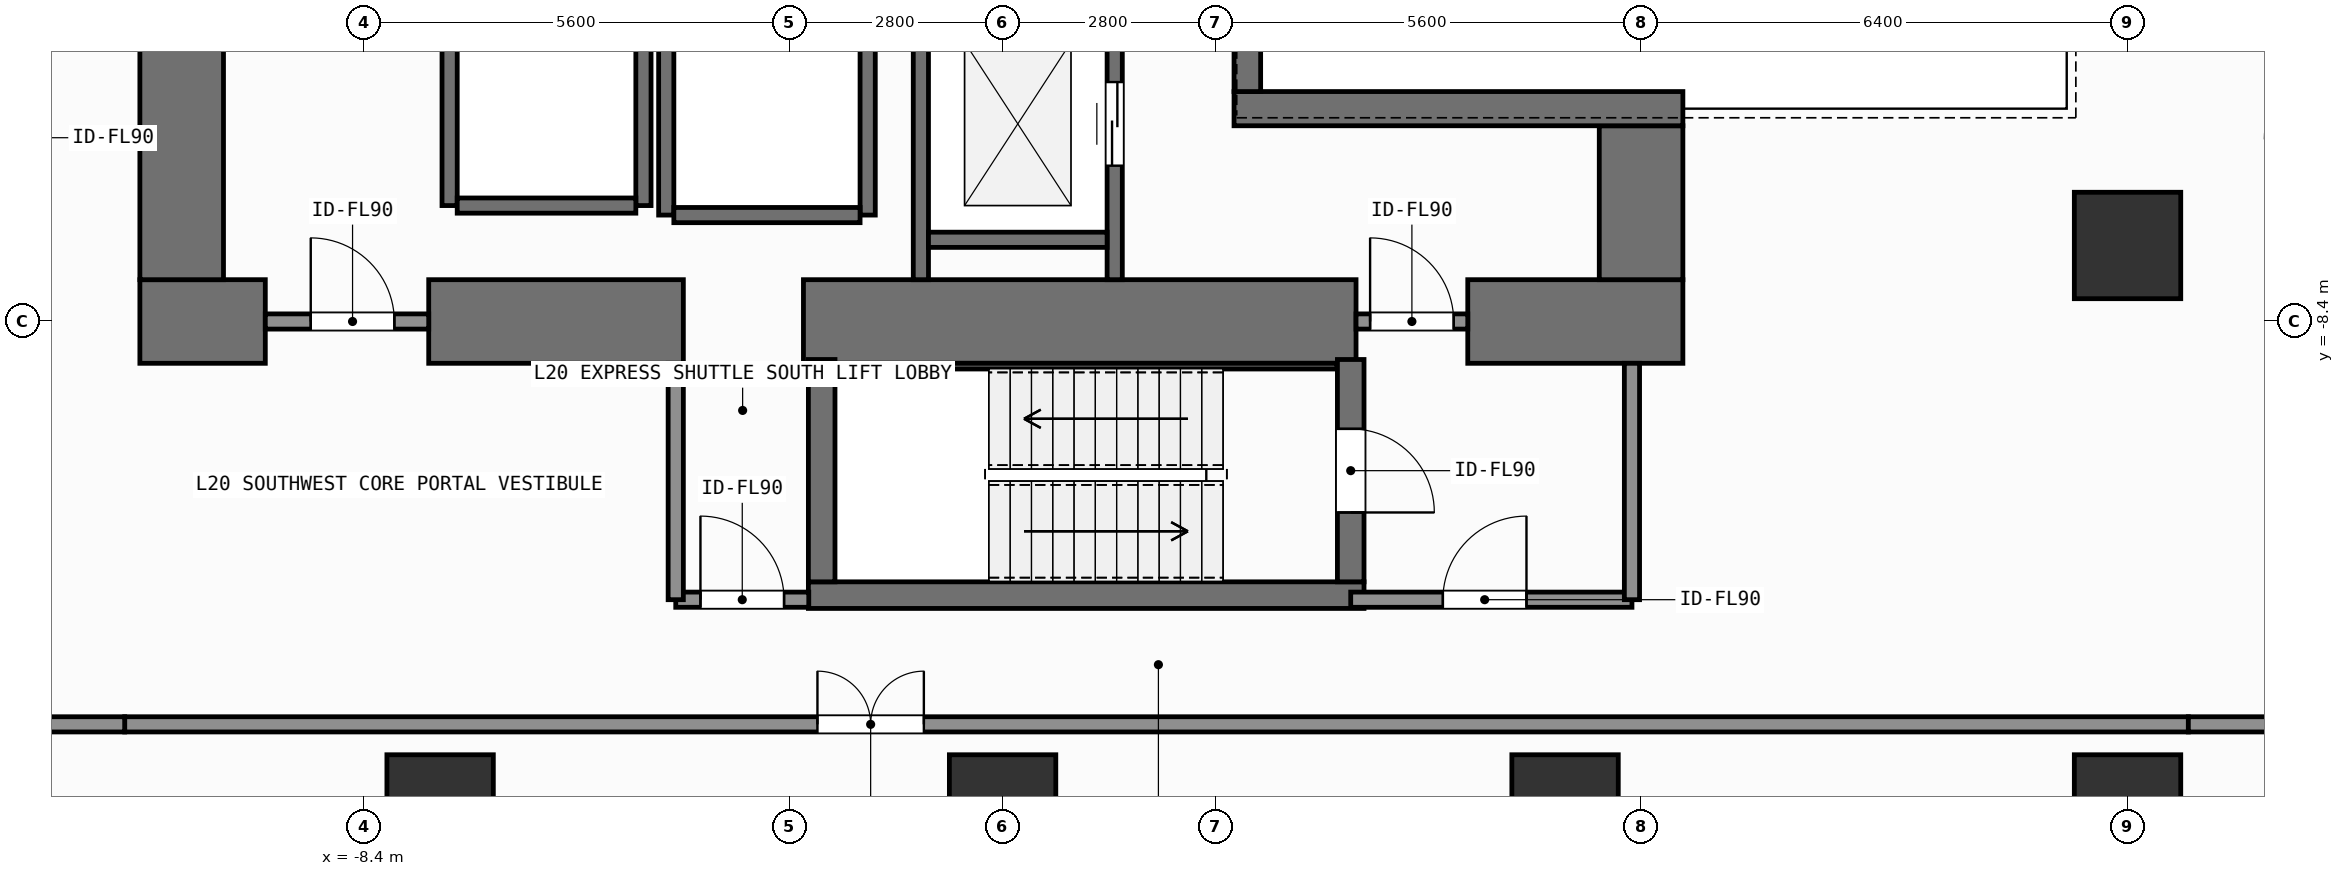
"""IFC4 building model, lengths in metres.
Left out: names, types, materials, properties, quantities, classifications, styles, units other than length and angle.
Written with IfcOpenShell. Run it as: python <this file> out.ifc"""

import sys

from ifc_helpers import new_model, si_unit, direction, frame, frame_2d, origin, origin_2d, place, context, subcontext, project, spatial, rectangle, extrude, element, fill, save


model = new_model("IFC4")
c1 = context("Model", 3, precision=1e-05, world=origin(), true_north=direction((0.0, 1.0)))
c2 = subcontext(c1, "Body", "Model", "MODEL_VIEW")
j1 = project(units=[si_unit("LENGTHUNIT", "METRE"), si_unit("PLANEANGLEUNIT", "RADIAN")], contexts=[c1])
p1 = place(None, origin())
s1 = spatial("IfcSite", under=j1, at=p1, CompositionType="ELEMENT")
p2 = place(p1, origin())
s2 = spatial("IfcBuilding", under=s1, at=p2, CompositionType="ELEMENT")
p3 = place(p2, frame((0.0, 0.0, 77.4)))
s3 = spatial("IfcBuildingStorey", under=s2, at=p3, CompositionType="ELEMENT", Elevation=77.4)
p4 = place(p3, frame((-11.35, -8.4, 0.0), z_axis=(0.0, 0.0, 1.0), x_axis=(1.0, 0.0, 0.0)))
e1 = element("IfcWall", 1, at=p4, inside=s3, PredefinedType="SHEAR", context=c2, shape_type="SweptSolid", body=[
    extrude(rectangle(XDim=1.65, YDim=1.1, at=frame_2d((0.825, 0.0))), origin(), (0.0, 0.0, 1.0), 7.8),
])
p5 = place(p3, frame((-7.55, -8.4, 0.0), z_axis=(0.0, 0.0, 1.0), x_axis=(1.0, 0.0, 0.0)))
e2 = element("IfcWall", 2, at=p5, inside=s3, PredefinedType="SHEAR", context=c2, shape_type="SweptSolid", body=[
    extrude(rectangle(XDim=3.35, YDim=1.1, at=frame_2d((1.675, 0.0))), origin(), (0.0, 0.0, 1.0), 7.8),
])
p6 = place(p3, frame((-2.62, -8.4, 0.0), z_axis=(0.0, 0.0, 1.0), x_axis=(1.0, 0.0, 0.0)))
e3 = element("IfcWall", 3, at=p6, inside=s3, PredefinedType="SHEAR", context=c2, shape_type="SweptSolid", body=[
    extrude(rectangle(XDim=7.27, YDim=1.1, at=frame_2d((3.635, 0.0))), origin(), (0.0, 0.0, 1.0), 7.8),
])
p7 = place(p3, frame((6.12, -8.4, 0.0), z_axis=(0.0, 0.0, 1.0), x_axis=(1.0, 0.0, 0.0)))
e4 = element("IfcWall", 4, at=p7, inside=s3, PredefinedType="SHEAR", context=c2, shape_type="SweptSolid", body=[
    extrude(rectangle(XDim=2.83, YDim=1.1, at=frame_2d((1.415, 0.0))), origin(), (0.0, 0.0, 1.0), 7.8),
])
p8 = place(p3, frame((-10.8, -7.85, 0.0), z_axis=(0.0, 0.0, 1.0), x_axis=(0.0, 1.0, 0.0)))
e5 = element("IfcWall", 5, at=p8, inside=s3, PredefinedType="SHEAR", context=c2, shape_type="SweptSolid", body=[
    extrude(rectangle(XDim=15.7, YDim=1.1, at=frame_2d((7.85, 0.0))), origin(), (0.0, 0.0, 1.0), 7.8),
])
p9 = place(p3, frame((8.4, -7.85, 0.0), z_axis=(0.0, 0.0, 1.0), x_axis=(0.0, 1.0, 0.0)))
e6 = element("IfcWall", 6, at=p9, inside=s3, PredefinedType="SHEAR", context=c2, shape_type="SweptSolid", body=[
    extrude(rectangle(XDim=2.025, YDim=1.1, at=frame_2d((1.013, 0.0))), origin(), (0.0, 0.0, 1.0), 7.8),
])
p10 = place(p3, frame((3.045, -5.6, 0.0), z_axis=(0.0, 0.0, 1.0), x_axis=(1.0, 0.0, 0.0)))
e7 = element("IfcWall", 7, at=p10, inside=s3, PredefinedType="SHEAR", context=c2, shape_type="SweptSolid", body=[
    extrude(rectangle(XDim=5.905, YDim=0.45, at=frame_2d((2.953, 0.0))), origin(), (0.0, 0.0, 1.0), 7.8),
])
p11 = place(p3, frame((3.22, -5.375, 0.0), z_axis=(0.0, 0.0, 1.0), x_axis=(0.0, 1.0, 0.0)))
e8 = element("IfcWall", 8, at=p11, inside=s3, PredefinedType="SHEAR", context=c2, shape_type="SweptSolid", body=[
    extrude(rectangle(XDim=10.75, YDim=0.35, at=frame_2d((5.375, 0.0))), origin(), (0.0, 0.0, 1.0), 7.8),
])
p12 = place(p3, frame((-2.555, -12.0, 0.0), z_axis=(0.0, 0.0, 1.0), x_axis=(1.0, 0.0, 0.0)))
e9 = element("IfcWall", 9, at=p12, inside=s3, PredefinedType="SHEAR", context=c2, shape_type="SweptSolid", body=[
    extrude(rectangle(XDim=7.31, YDim=0.35, at=frame_2d((3.655, 0.0))), origin(), (0.0, 0.0, 1.0), 7.8),
])
p13 = place(p3, frame((-2.2, -8.988, 0.0), z_axis=(0.0, 0.0, 1.0), x_axis=(1.0, 0.0, 0.0)))
e10 = element("IfcWall", 10, at=p13, inside=s3, PredefinedType="SHEAR", context=c2, shape_type="SweptSolid", body=[
    extrude(rectangle(XDim=6.6, YDim=0.075, at=frame_2d((3.3, 0.0))), origin(), (0.0, 0.0, 1.0), 7.8),
])
p14 = place(p3, frame((-2.38, -11.825, 0.0), z_axis=(0.0, 0.0, 1.0), x_axis=(0.0, 1.0, 0.0)))
e11 = element("IfcWall", 11, at=p14, inside=s3, PredefinedType="SHEAR", context=c2, shape_type="SweptSolid", body=[
    extrude(rectangle(XDim=2.925, YDim=0.35, at=frame_2d((1.462, 0.0))), origin(), (0.0, 0.0, 1.0), 7.8),
])
p15 = place(p3, frame((4.58, -8.9, 0.0), z_axis=(0.0, 0.0, 1.0), x_axis=(0.0, -1.0, 0.0)))
e12 = element("IfcWall", 12, at=p15, inside=s3, PredefinedType="SHEAR", context=c2, shape_type="SweptSolid", body=[
    extrude(rectangle(XDim=2.925, YDim=0.35, at=frame_2d((1.462, 0.0))), origin(), (0.0, 0.0, 1.0), 7.8),
])
p16 = place(p15, frame((0.913, 0.0, 0.0)))
e13 = element("IfcOpeningElement", 13, at=p16, cuts=e12, PredefinedType="OPENING", context=c2, shape_type="SweptSolid", body=[
    extrude(rectangle(XDim=1.1, YDim=2.15, at=frame_2d((0.55, 1.075))), frame((0.0, 0.185, 0.0), z_axis=(0.0, -1.0, 0.0), x_axis=(1.0, 0.0, 0.0)), (0.0, 0.0, 1.0), 0.37),
])
for number, where, z_axis, x_axis in (
    (14, (-7.4, -14.8, 0.0), (0.0, 0.0, 1.0), (1.0, 0.0, 0.0)),
    (15, (0.0, -14.8, 0.0), (0.0, 0.0, 1.0), (1.0, 0.0, 0.0)),
    (16, (7.4, -14.8, 0.0), (0.0, 0.0, 1.0), (1.0, 0.0, 0.0)),
    (17, (14.8, -14.8, 0.0), (0.0, 0.0, 1.0), (1.0, 0.0, 0.0)),
    (18, (14.8, -7.4, 0.0), (0.0, 0.0, 1.0), (1.0, 0.0, 0.0)),
):
    element("IfcColumn", number, at=place(p3, frame(where, z_axis=z_axis, x_axis=x_axis)), inside=s3, PredefinedType="COLUMN", context=c2, shape_type="SweptSolid", body=[
        extrude(rectangle(XDim=1.4, YDim=1.4, at=origin_2d()), origin(), (0.0, 0.0, 1.0), 7.8),
    ])
for number, where, z_axis, x_axis in (
    (19, (-7.275, -6.875, 0.0), (0.0, 0.0, 1.0), (0.0, 1.0, 0.0)),
    (20, (-4.725, -6.875, 0.0), (0.0, 0.0, 1.0), (0.0, 1.0, 0.0)),
):
    element("IfcWall", number, at=place(p3, frame(where, z_axis=z_axis, x_axis=x_axis)), inside=s3, PredefinedType="SHEAR", context=c2, shape_type="SweptSolid", body=[
        extrude(rectangle(XDim=2.55, YDim=0.2, at=frame_2d((1.275, 0.0))), origin(), (0.0, 0.0, 1.0), 7.52),
    ])
p17 = place(p3, frame((-7.175, -6.875, 0.0), z_axis=(0.0, 0.0, 1.0), x_axis=(1.0, 0.0, 0.0)))
e21 = element("IfcWall", 21, at=p17, inside=s3, PredefinedType="SHEAR", context=c2, shape_type="SweptSolid", body=[
    extrude(rectangle(XDim=2.35, YDim=0.2, at=frame_2d((1.175, 0.0))), origin(), (0.0, 0.0, 1.0), 7.52),
])
for number, where, z_axis, x_axis in (
    (22, (-4.425, -7.0, 0.0), (0.0, 0.0, 1.0), (0.0, 1.0, 0.0)),
    (23, (-1.775, -7.0, 0.0), (0.0, 0.0, 1.0), (0.0, 1.0, 0.0)),
):
    element("IfcWall", number, at=place(p3, frame(where, z_axis=z_axis, x_axis=x_axis)), inside=s3, PredefinedType="SHEAR", context=c2, shape_type="SweptSolid", body=[
        extrude(rectangle(XDim=2.8, YDim=0.2, at=frame_2d((1.4, 0.0))), origin(), (0.0, 0.0, 1.0), 7.52),
    ])
p18 = place(p3, frame((-4.325, -7.0, 0.0), z_axis=(0.0, 0.0, 1.0), x_axis=(1.0, 0.0, 0.0)))
e24 = element("IfcWall", 24, at=p18, inside=s3, PredefinedType="SHEAR", context=c2, shape_type="SweptSolid", body=[
    extrude(rectangle(XDim=2.45, YDim=0.2, at=frame_2d((1.225, 0.0))), origin(), (0.0, 0.0, 1.0), 7.52),
])
p19 = place(p3, frame((-1.075, -7.85, 0.0), z_axis=(0.0, 0.0, 1.0), x_axis=(0.0, 1.0, 0.0)))
e25 = element("IfcWall", 25, at=p19, inside=s3, PredefinedType="SHEAR", context=c2, shape_type="SweptSolid", body=[
    extrude(rectangle(XDim=3.575, YDim=0.2, at=frame_2d((1.788, 0.0))), origin(), (0.0, 0.0, 1.0), 7.52),
])
p20 = place(p3, frame((1.475, -7.85, 0.0), z_axis=(0.0, 0.0, 1.0), x_axis=(0.0, 1.0, 0.0)))
e26 = element("IfcWall", 26, at=p20, inside=s3, PredefinedType="SHEAR", context=c2, shape_type="SweptSolid", body=[
    extrude(rectangle(XDim=3.575, YDim=0.2, at=frame_2d((1.788, 0.0))), origin(), (0.0, 0.0, 1.0), 7.52),
])
p21 = place(p20, frame((1.5, 0.0, 0.0)))
e27 = element("IfcOpeningElement", 27, at=p21, cuts=e26, PredefinedType="OPENING", context=c2, shape_type="SweptSolid", body=[
    extrude(rectangle(XDim=1.1, YDim=2.2, at=frame_2d((0.55, 1.1))), frame((0.0, 0.11, 0.0), z_axis=(0.0, -1.0, 0.0), x_axis=(1.0, 0.0, 0.0)), (0.0, 0.0, 1.0), 0.22),
])
p22 = place(p3, frame((-0.975, -7.325, 0.0), z_axis=(0.0, 0.0, 1.0), x_axis=(1.0, 0.0, 0.0)))
e28 = element("IfcWall", 28, at=p22, inside=s3, PredefinedType="SHEAR", context=c2, shape_type="SweptSolid", body=[
    extrude(rectangle(XDim=2.35, YDim=0.2, at=frame_2d((1.175, 0.0))), origin(), (0.0, 0.0, 1.0), 7.52),
])
p23 = place(p3, frame((4.58, -12.06, 0.0), z_axis=(0.0, 0.0, 1.0), x_axis=(1.0, 0.0, 0.0)))
e29 = element("IfcWall", 29, at=p23, inside=s3, PredefinedType="SOLIDWALL", context=c2, shape_type="SweptSolid", body=[
    extrude(rectangle(XDim=3.7, YDim=0.2, at=frame_2d((1.85, 0.0))), origin(), (0.0, 0.0, 1.0), 7.52),
])
p24 = place(p23, frame((1.212, 0.0, 0.0)))
e30 = element("IfcOpeningElement", 30, at=p24, cuts=e29, PredefinedType="OPENING", context=c2, shape_type="SweptSolid", body=[
    extrude(rectangle(XDim=1.1, YDim=2.15, at=frame_2d((0.55, 1.075))), frame((0.0, 0.11, 0.0), z_axis=(0.0, -1.0, 0.0), x_axis=(1.0, 0.0, 0.0)), (0.0, 0.0, 1.0), 0.22),
])
p25 = place(p3, frame((4.65, -8.4, 0.0), z_axis=(0.0, 0.0, 1.0), x_axis=(1.0, 0.0, 0.0)))
e31 = element("IfcWall", 31, at=p25, inside=s3, PredefinedType="SOLIDWALL", context=c2, shape_type="SweptSolid", body=[
    extrude(rectangle(XDim=1.47, YDim=0.2, at=frame_2d((0.735, 0.0))), origin(), (0.0, 0.0, 1.0), 6.56),
])
p26 = place(p25, frame((0.185, 0.0, 0.0)))
e32 = element("IfcOpeningElement", 32, at=p26, cuts=e31, PredefinedType="OPENING", context=c2, shape_type="SweptSolid", body=[
    extrude(rectangle(XDim=1.1, YDim=2.15, at=frame_2d((0.55, 1.075))), frame((0.0, 0.11, 0.0), z_axis=(0.0, -1.0, 0.0), x_axis=(1.0, 0.0, 0.0)), (0.0, 0.0, 1.0), 0.22),
])
p27 = place(p3, frame((-9.7, -8.4, 0.0), z_axis=(0.0, 0.0, 1.0), x_axis=(1.0, 0.0, 0.0)))
e33 = element("IfcWall", 33, at=p27, inside=s3, PredefinedType="SOLIDWALL", context=c2, shape_type="SweptSolid", body=[
    extrude(rectangle(XDim=2.15, YDim=0.2, at=frame_2d((1.075, 0.0))), origin(), (0.0, 0.0, 1.0), 6.56),
])
p28 = place(p27, frame((0.598, 0.0, 0.0)))
e34 = element("IfcOpeningElement", 34, at=p28, cuts=e33, PredefinedType="OPENING", context=c2, shape_type="SweptSolid", body=[
    extrude(rectangle(XDim=1.1, YDim=2.15, at=frame_2d((0.55, 1.075))), frame((0.0, 0.11, 0.0), z_axis=(0.0, -1.0, 0.0), x_axis=(1.0, 0.0, 0.0)), (0.0, 0.0, 1.0), 0.22),
])
p29 = place(p3, frame((-4.3, -12.06, 0.0), z_axis=(0.0, 0.0, 1.0), x_axis=(1.0, 0.0, 0.0)))
e35 = element("IfcWall", 35, at=p29, inside=s3, PredefinedType="SOLIDWALL", context=c2, shape_type="SweptSolid", body=[
    extrude(rectangle(XDim=1.75, YDim=0.2, at=frame_2d((0.875, 0.0))), origin(), (0.0, 0.0, 1.0), 7.52),
])
p30 = place(p29, frame((0.325, 0.0, 0.0)))
e36 = element("IfcOpeningElement", 36, at=p30, cuts=e35, PredefinedType="OPENING", context=c2, shape_type="SweptSolid", body=[
    extrude(rectangle(XDim=1.1, YDim=2.15, at=frame_2d((0.55, 1.075))), frame((0.0, 0.11, 0.0), z_axis=(0.0, -1.0, 0.0), x_axis=(1.0, 0.0, 0.0)), (0.0, 0.0, 1.0), 0.22),
])
p31 = place(p3, frame((-11.55, -13.7, 0.0), z_axis=(0.0, 0.0, 1.0), x_axis=(1.0, 0.0, 0.0)))
e37 = element("IfcWall", 37, at=p31, inside=s3, PredefinedType="SOLIDWALL", context=c2, shape_type="SweptSolid", body=[
    extrude(rectangle(XDim=27.15, YDim=0.2, at=frame_2d((13.575, 0.0))), origin(), (0.0, 0.0, 1.0), 7.52),
])
p32 = place(p31, frame((9.114, 0.0, 0.0)))
e38 = element("IfcOpeningElement", 38, at=p32, cuts=e37, PredefinedType="OPENING", context=c2, shape_type="SweptSolid", body=[
    extrude(rectangle(XDim=1.4, YDim=2.2, at=frame_2d((0.7, 1.1))), frame((0.0, 0.11, 0.0), z_axis=(0.0, -1.0, 0.0), x_axis=(1.0, 0.0, 0.0)), (0.0, 0.0, 1.0), 0.22),
])
for number, where, z_axis, x_axis in (
    (39, (8.28, -12.06, 0.0), (0.0, 0.0, 1.0), (0.0, 1.0, 0.0)),
    (40, (-4.3, -12.06, 0.0), (0.0, 0.0, 1.0), (0.0, 1.0, 0.0)),
):
    element("IfcWall", number, at=place(p3, frame(where, z_axis=z_axis, x_axis=x_axis)), inside=s3, PredefinedType="SOLIDWALL", context=c2, shape_type="SweptSolid", body=[
        extrude(rectangle(XDim=3.11, YDim=0.2, at=frame_2d((1.555, 0.0))), origin(), (0.0, 0.0, 1.0), 7.52),
    ])
p33 = place(p3, frame((-13.5, -13.7, 0.0), z_axis=(0.0, 0.0, 1.0), x_axis=(1.0, 0.0, 0.0)))
e41 = element("IfcWall", 41, at=p33, inside=s3, PredefinedType="SOLIDWALL", context=c2, shape_type="SweptSolid", body=[
    extrude(rectangle(XDim=1.95, YDim=0.2, at=frame_2d((0.975, 0.0))), origin(), (0.0, 0.0, 1.0), 7.52),
])
p34 = place(p3, frame((15.6, -13.7, 0.0), z_axis=(0.0, 0.0, 1.0), x_axis=(1.0, 0.0, 0.0)))
e42 = element("IfcWall", 42, at=p34, inside=s3, PredefinedType="SOLIDWALL", context=c2, shape_type="SweptSolid", body=[
    extrude(rectangle(XDim=2.0, YDim=0.2, at=frame_2d((1.0, 0.0))), origin(), (0.0, 0.0, 1.0), 7.52),
])
p35 = place(p21, origin())
e43 = element("IfcDoor", 43, at=p35, inside=s3, OperationType="SLIDING_TO_LEFT", PredefinedType="DOOR", context=c2, shape_type="SweptSolid", body=[
    extrude(rectangle(XDim=1.1, YDim=2.2, at=frame_2d((0.55, 1.1))), frame((0.0, 0.025, 0.0), z_axis=(0.0, -1.0, 0.0), x_axis=(1.0, 0.0, 0.0)), (0.0, 0.0, 1.0), 0.05),
])
fill(e27, e43)
p36 = place(p16, origin())
e44 = element("IfcDoor", 44, at=p36, inside=s3, OperationType="SINGLE_SWING_RIGHT", PredefinedType="DOOR", context=c2, shape_type="SweptSolid", body=[
    extrude(rectangle(XDim=1.1, YDim=2.15, at=frame_2d((0.55, 1.075))), frame((0.0, 0.025, 0.0), z_axis=(0.0, -1.0, 0.0), x_axis=(1.0, 0.0, 0.0)), (0.0, 0.0, 1.0), 0.05),
])
fill(e13, e44)
p37 = place(p24, origin())
e45 = element("IfcDoor", 45, at=p37, inside=s3, OperationType="SINGLE_SWING_RIGHT", PredefinedType="DOOR", context=c2, shape_type="SweptSolid", body=[
    extrude(rectangle(XDim=1.1, YDim=2.15, at=frame_2d((0.55, 1.075))), frame((0.0, 0.025, 0.0), z_axis=(0.0, -1.0, 0.0), x_axis=(1.0, 0.0, 0.0)), (0.0, 0.0, 1.0), 0.05),
])
fill(e30, e45)
p38 = place(p26, origin())
e46 = element("IfcDoor", 46, at=p38, inside=s3, OperationType="SINGLE_SWING_LEFT", PredefinedType="DOOR", context=c2, shape_type="SweptSolid", body=[
    extrude(rectangle(XDim=1.1, YDim=2.15, at=frame_2d((0.55, 1.075))), frame((0.0, 0.025, 0.0), z_axis=(0.0, -1.0, 0.0), x_axis=(1.0, 0.0, 0.0)), (0.0, 0.0, 1.0), 0.05),
])
fill(e32, e46)
p39 = place(p28, origin())
e47 = element("IfcDoor", 47, at=p39, inside=s3, OperationType="SINGLE_SWING_LEFT", PredefinedType="DOOR", context=c2, shape_type="SweptSolid", body=[
    extrude(rectangle(XDim=1.1, YDim=2.15, at=frame_2d((0.55, 1.075))), frame((0.0, 0.025, 0.0), z_axis=(0.0, -1.0, 0.0), x_axis=(1.0, 0.0, 0.0)), (0.0, 0.0, 1.0), 0.05),
])
fill(e34, e47)
p40 = place(p30, origin())
e48 = element("IfcDoor", 48, at=p40, inside=s3, OperationType="SINGLE_SWING_LEFT", PredefinedType="DOOR", context=c2, shape_type="SweptSolid", body=[
    extrude(rectangle(XDim=1.1, YDim=2.15, at=frame_2d((0.55, 1.075))), frame((0.0, 0.025, 0.0), z_axis=(0.0, -1.0, 0.0), x_axis=(1.0, 0.0, 0.0)), (0.0, 0.0, 1.0), 0.05),
])
fill(e36, e48)
p41 = place(p32, origin())
e49 = element("IfcDoor", 49, at=p41, inside=s3, OperationType="SINGLE_SWING_LEFT", PredefinedType="DOOR", context=c2, shape_type="SweptSolid", body=[
    extrude(rectangle(XDim=1.4, YDim=2.2, at=frame_2d((0.7, 1.1))), frame((0.0, 0.025, 0.0), z_axis=(0.0, -1.0, 0.0), x_axis=(1.0, 0.0, 0.0)), (0.0, 0.0, 1.0), 0.05),
])
fill(e38, e49)
save(model, sys.argv[1])
